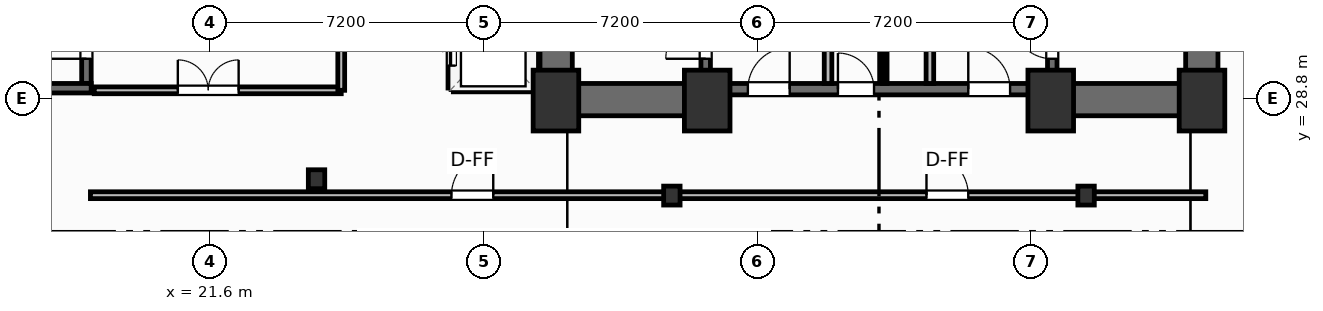
"""IFC4 building model, lengths in metres.
Left out: names, types, materials, properties, quantities, classifications, styles, units other than length and angle.
Written with IfcOpenShell. Run it as: python <this file> out.ifc"""

import sys

from ifc_helpers import new_model, si_unit, direction, frame, frame_2d, origin, origin_2d, place, context, subcontext, project, spatial, rectangle, i_section, extrude, element, fill, save


model = new_model("IFC4")
c1 = context("Model", 3, precision=1e-05, world=origin(), true_north=direction((0.0, 1.0)))
c2 = subcontext(c1, "Body", "Model", "MODEL_VIEW")
j1 = project(units=[si_unit("LENGTHUNIT", "METRE"), si_unit("PLANEANGLEUNIT", "RADIAN")], contexts=[c1])
p1 = place(None, origin())
s1 = spatial("IfcSite", under=j1, at=p1, CompositionType="ELEMENT")
p2 = place(p1, origin())
s2 = spatial("IfcBuilding", under=s1, at=p2, CompositionType="ELEMENT")
p3 = place(p2, frame((0.0, 0.0, -9.0)))
s3 = spatial("IfcBuildingStorey", under=s2, at=p3, CompositionType="ELEMENT", Elevation=-9.0)
for number, where, z_axis, x_axis in (
    (1, (30.7, 28.75, 0.0), (0.0, 0.0, 1.0), (1.0, 0.0, 0.0)),
    (2, (34.68, 28.75, 0.0), (0.0, 0.0, 1.0), (1.0, 0.0, 0.0)),
    (3, (43.72, 28.75, 0.0), (0.0, 0.0, 1.0), (1.0, 0.0, 0.0)),
    (4, (47.7, 28.75, 0.0), (0.0, 0.0, 1.0), (1.0, 0.0, 0.0)),
):
    element("IfcColumn", number, at=place(p3, frame(where, z_axis=z_axis, x_axis=x_axis)), inside=s3, PredefinedType="COLUMN", context=c2, shape_type="SweptSolid", body=[
        extrude(rectangle(XDim=1.2, YDim=1.6, at=origin_2d()), origin(), (0.0, 0.0, 1.0), 4.5),
    ])
for number, where, z_axis, x_axis in (
    (5, (33.75, 26.25, 0.0), (0.0, 0.0, 1.0), (1.0, 0.0, 0.0)),
    (6, (44.65, 26.25, 0.0), (0.0, 0.0, 1.0), (1.0, 0.0, 0.0)),
    (7, (24.4, 26.68, 0.0), (0.0, 0.0, 1.0), (1.0, 0.0, 0.0)),
):
    element("IfcColumn", number, at=place(p3, frame(where, z_axis=z_axis, x_axis=x_axis)), inside=s3, PredefinedType="COLUMN", context=c2, shape_type="SweptSolid", body=[
        extrude(i_section(OverallWidth=0.432, OverallDepth=0.498, WebThickness=0.056, FlangeThickness=0.089, FilletRadius=0.025, at=origin_2d()), origin(), (0.0, 0.0, 1.0), 4.5),
    ])
for number, where, z_axis, x_axis in (
    (8, (30.705, 29.2, 0.0), (0.0, 0.0, 1.0), (0.0, 1.0, 0.0)),
    (9, (47.695, 29.2, 0.0), (0.0, 0.0, 1.0), (0.0, 1.0, 0.0)),
):
    element("IfcWall", number, at=place(p3, frame(where, z_axis=z_axis, x_axis=x_axis)), inside=s3, PredefinedType="SHEAR", context=c2, shape_type="SweptSolid", body=[
        extrude(rectangle(XDim=9.22, YDim=0.85, at=frame_2d((4.61, 0.0))), origin(), (0.0, 0.0, 1.0), 4.2),
    ])
for number, where, z_axis, x_axis in (
    (10, (30.28, 28.775, 0.0), (0.0, 0.0, 1.0), (1.0, 0.0, 0.0)),
    (11, (43.6, 28.775, 0.0), (0.0, 0.0, 1.0), (1.0, 0.0, 0.0)),
):
    element("IfcWall", number, at=place(p3, frame(where, z_axis=z_axis, x_axis=x_axis)), inside=s3, PredefinedType="SHEAR", context=c2, shape_type="SweptSolid", body=[
        extrude(rectangle(XDim=4.52, YDim=0.85, at=frame_2d((2.26, 0.0))), origin(), (0.0, 0.0, 1.0), 4.2),
    ])
p4 = place(p3, frame((34.8, 29.05, 0.0), z_axis=(0.0, 0.0, 1.0), x_axis=(1.0, 0.0, 0.0)))
e12 = element("IfcWall", 12, at=p4, inside=s3, PredefinedType="SHEAR", context=c2, shape_type="SweptSolid", body=[
    extrude(rectangle(XDim=8.8, YDim=0.3, at=frame_2d((4.4, 0.0))), origin(), (0.0, 0.0, 1.0), 4.2),
])
p5 = place(p4, frame((0.95, 0.0, 0.0)))
e13 = element("IfcOpeningElement", 13, at=p5, cuts=e12, PredefinedType="OPENING", context=c2, shape_type="SweptSolid", body=[
    extrude(rectangle(XDim=1.1, YDim=2.15, at=frame_2d((0.55, 1.075))), frame((0.0, 0.16, 0.0), z_axis=(0.0, -1.0, 0.0), x_axis=(1.0, 0.0, 0.0)), (0.0, 0.0, 1.0), 0.32),
])
p6 = place(p4, frame((6.75, 0.0, 0.0)))
e14 = element("IfcOpeningElement", 14, at=p6, cuts=e12, PredefinedType="OPENING", context=c2, shape_type="SweptSolid", body=[
    extrude(rectangle(XDim=1.1, YDim=2.15, at=frame_2d((0.55, 1.075))), frame((0.0, 0.16, 0.0), z_axis=(0.0, -1.0, 0.0), x_axis=(1.0, 0.0, 0.0)), (0.0, 0.0, 1.0), 0.32),
])
p7 = place(p4, frame((3.32, 0.0, 0.0)))
e15 = element("IfcOpeningElement", 15, at=p7, cuts=e12, PredefinedType="OPENING", context=c2, shape_type="SweptSolid", body=[
    extrude(rectangle(XDim=0.95, YDim=2.15, at=frame_2d((0.475, 1.075))), frame((0.0, 0.16, 0.0), z_axis=(0.0, -1.0, 0.0), x_axis=(1.0, 0.0, 0.0)), (0.0, 0.0, 1.0), 0.32),
])
p8 = place(p3, frame((34.64, 29.2, 0.0), z_axis=(0.0, 0.0, 1.0), x_axis=(0.0, 1.0, 0.0)))
e16 = element("IfcWall", 16, at=p8, inside=s3, PredefinedType="SHEAR", context=c2, shape_type="SweptSolid", body=[
    extrude(rectangle(XDim=9.22, YDim=0.25, at=frame_2d((4.61, 0.0))), origin(), (0.0, 0.0, 1.0), 4.2),
])
p9 = place(p8, frame((0.65, 0.0, 0.0)))
e17 = element("IfcOpeningElement", 17, at=p9, cuts=e16, PredefinedType="OPENING", context=c2, shape_type="SweptSolid", body=[
    extrude(rectangle(XDim=1.05, YDim=2.15, at=frame_2d((0.525, 1.075))), frame((0.0, 0.135, 0.0), z_axis=(0.0, -1.0, 0.0), x_axis=(1.0, 0.0, 0.0)), (0.0, 0.0, 1.0), 0.27),
])
p10 = place(p3, frame((43.76, 29.2, 0.0), z_axis=(0.0, 0.0, 1.0), x_axis=(0.0, 1.0, 0.0)))
e18 = element("IfcWall", 18, at=p10, inside=s3, PredefinedType="SHEAR", context=c2, shape_type="SweptSolid", body=[
    extrude(rectangle(XDim=9.22, YDim=0.25, at=frame_2d((4.61, 0.0))), origin(), (0.0, 0.0, 1.0), 4.2),
])
p11 = place(p10, frame((0.65, 0.0, 0.0)))
e19 = element("IfcOpeningElement", 19, at=p11, cuts=e18, PredefinedType="OPENING", context=c2, shape_type="SweptSolid", body=[
    extrude(rectangle(XDim=1.05, YDim=2.15, at=frame_2d((0.525, 1.075))), frame((0.0, 0.135, 0.0), z_axis=(0.0, -1.0, 0.0), x_axis=(1.0, 0.0, 0.0)), (0.0, 0.0, 1.0), 0.27),
])
p12 = place(p3, frame((18.345, 29.2, 0.0), z_axis=(0.0, 0.0, 1.0), x_axis=(0.0, 1.0, 0.0)))
e20 = element("IfcWall", 20, at=p12, inside=s3, PredefinedType="SHEAR", context=c2, shape_type="SweptSolid", body=[
    extrude(rectangle(XDim=9.22, YDim=0.25, at=frame_2d((4.61, 0.0))), origin(), (0.0, 0.0, 1.0), 4.2),
])
p13 = place(p12, frame((0.65, 0.0, 0.0)))
e21 = element("IfcOpeningElement", 21, at=p13, cuts=e20, PredefinedType="OPENING", context=c2, shape_type="SweptSolid", body=[
    extrude(rectangle(XDim=1.05, YDim=2.15, at=frame_2d((0.525, 1.075))), frame((0.0, 0.135, 0.0), z_axis=(0.0, -1.0, 0.0), x_axis=(1.0, 0.0, 0.0)), (0.0, 0.0, 1.0), 0.27),
])
p14 = place(p3, frame((14.58, 29.075, 0.0), z_axis=(0.0, 0.0, 1.0), x_axis=(1.0, 0.0, 0.0)))
e22 = element("IfcWall", 22, at=p14, inside=s3, PredefinedType="SHEAR", context=c2, shape_type="SweptSolid", body=[
    extrude(rectangle(XDim=3.89, YDim=0.25, at=frame_2d((1.945, 0.0))), origin(), (0.0, 0.0, 1.0), 4.2),
])
p15 = place(p3, frame((18.45, 26.26, 0.0), z_axis=(0.0, 0.0, 1.0), x_axis=(1.0, 0.0, 0.0)))
e23 = element("IfcWall", 23, at=p15, inside=s3, PredefinedType="PARTITIONING", context=c2, shape_type="SweptSolid", body=[
    extrude(rectangle(XDim=29.35, YDim=0.18, at=frame_2d((14.675, 0.0))), origin(), (0.0, 0.0, 1.0), 3.412),
])
p16 = place(p15, frame((9.5, 0.0, 0.0)))
e24 = element("IfcOpeningElement", 24, at=p16, cuts=e23, PredefinedType="OPENING", context=c2, shape_type="SweptSolid", body=[
    extrude(rectangle(XDim=1.1, YDim=2.15, at=frame_2d((0.55, 1.075))), frame((0.0, 0.1, 0.0), z_axis=(0.0, -1.0, 0.0), x_axis=(1.0, 0.0, 0.0)), (0.0, 0.0, 1.0), 0.2),
])
p17 = place(p15, frame((22.0, 0.0, 0.0)))
e25 = element("IfcOpeningElement", 25, at=p17, cuts=e23, PredefinedType="OPENING", context=c2, shape_type="SweptSolid", body=[
    extrude(rectangle(XDim=1.1, YDim=2.15, at=frame_2d((0.55, 1.075))), frame((0.0, 0.1, 0.0), z_axis=(0.0, -1.0, 0.0), x_axis=(1.0, 0.0, 0.0)), (0.0, 0.0, 1.0), 0.2),
])
p18 = place(p3, frame((18.55, 29.02, 0.0), z_axis=(0.0, 0.0, 1.0), x_axis=(1.0, 0.0, 0.0)))
e26 = element("IfcWall", 26, at=p18, inside=s3, PredefinedType="PARTITIONING", context=c2, shape_type="SweptSolid", body=[
    extrude(rectangle(XDim=6.5, YDim=0.18, at=frame_2d((3.25, 0.0))), origin(), (0.0, 0.0, 1.0), 4.2),
])
p19 = place(p18, frame((2.2, 0.0, 0.0)))
e27 = element("IfcOpeningElement", 27, at=p19, cuts=e26, PredefinedType="OPENING", context=c2, shape_type="SweptSolid", body=[
    extrude(rectangle(XDim=1.6, YDim=2.05, at=frame_2d((0.8, 1.025))), frame((0.0, 0.1, 0.0), z_axis=(0.0, -1.0, 0.0), x_axis=(1.0, 0.0, 0.0)), (0.0, 0.0, 1.0), 0.2),
])
p20 = place(p3, frame((25.05, 29.02, 0.0), z_axis=(0.0, 0.0, 1.0), x_axis=(0.0, 1.0, 0.0)))
e28 = element("IfcWall", 28, at=p20, inside=s3, PredefinedType="PARTITIONING", context=c2, shape_type="SweptSolid", body=[
    extrude(rectangle(XDim=9.43, YDim=0.18, at=frame_2d((4.715, 0.0))), origin(), (0.0, 0.0, 1.0), 4.2),
])
for number, where, z_axis, x_axis in (
    (29, (37.86, 29.2, 0.0), (0.0, 0.0, 1.0), (0.0, 1.0, 0.0)),
    (30, (40.54, 29.2, 0.0), (0.0, 0.0, 1.0), (0.0, 1.0, 0.0)),
):
    element("IfcWall", number, at=place(p3, frame(where, z_axis=z_axis, x_axis=x_axis)), inside=s3, PredefinedType="PARTITIONING", context=c2, shape_type="SweptSolid", body=[
        extrude(rectangle(XDim=5.18, YDim=0.2, at=frame_2d((2.59, 0.0))), origin(), (0.0, 0.0, 1.0), 4.2),
    ])
p21 = place(p3, frame((39.35, 29.2, 0.0), z_axis=(0.0, 0.0, 1.0), x_axis=(0.0, 1.0, 0.0)))
e31 = element("IfcWall", 31, at=p21, inside=s3, PredefinedType="PARTITIONING", context=c2, shape_type="SweptSolid", body=[
    extrude(rectangle(XDim=5.22, YDim=0.125, at=frame_2d((2.61, 0.0))), origin(), (0.0, 0.0, 1.0), 4.2),
])
p22 = place(p21, frame((2.05, 0.0, 0.0)))
e32 = element("IfcOpeningElement", 32, at=p22, cuts=e31, PredefinedType="OPENING", context=c2, shape_type="SweptSolid", body=[
    extrude(rectangle(XDim=0.85, YDim=2.05, at=frame_2d((0.425, 1.025))), frame((0.0, 0.073, 0.0), z_axis=(0.0, -1.0, 0.0), x_axis=(1.0, 0.0, 0.0)), (0.0, 0.0, 1.0), 0.145),
])
p23 = place(p3, frame((28.0, 29.08, 0.0), z_axis=(0.0, 0.0, 1.0), x_axis=(1.0, 0.0, 0.0)))
e33 = element("IfcWall", 33, at=p23, inside=s3, PredefinedType="PARTITIONING", context=c2, shape_type="SweptSolid", body=[
    extrude(rectangle(XDim=2.1, YDim=0.2, at=frame_2d((1.05, 0.0))), origin(), (0.0, 0.0, 1.0), 4.2),
])
p24 = place(p3, frame((30.12, 29.08, 0.0), z_axis=(0.0, 0.0, 1.0), x_axis=(0.0, 1.0, 0.0)))
e34 = element("IfcWall", 34, at=p24, inside=s3, PredefinedType="PARTITIONING", context=c2, shape_type="SweptSolid", body=[
    extrude(rectangle(XDim=6.89, YDim=0.2, at=frame_2d((3.445, 0.0))), origin(), (0.0, 0.0, 1.0), 4.2),
])
p25 = place(p3, frame((27.96, 29.08, 0.0), z_axis=(0.0, 0.0, 1.0), x_axis=(0.0, 1.0, 0.0)))
e35 = element("IfcWall", 35, at=p25, inside=s3, PredefinedType="PARTITIONING", context=c2, shape_type="SweptSolid", body=[
    extrude(rectangle(XDim=6.89, YDim=0.2, at=frame_2d((3.445, 0.0))), origin(), (0.0, 0.0, 1.0), 4.2),
])
p26 = place(p25, frame((0.59, 0.0, 0.0)))
e36 = element("IfcOpeningElement", 36, at=p26, cuts=e35, PredefinedType="OPENING", context=c2, shape_type="SweptSolid", body=[
    extrude(rectangle(XDim=1.1, YDim=2.15, at=frame_2d((0.55, 1.075))), frame((0.0, 0.11, 0.0), z_axis=(0.0, -1.0, 0.0), x_axis=(1.0, 0.0, 0.0)), (0.0, 0.0, 1.0), 0.22),
])
p27 = place(p25, frame((2.89, 0.0, 0.0)))
e37 = element("IfcOpeningElement", 37, at=p27, cuts=e35, PredefinedType="OPENING", context=c2, shape_type="SweptSolid", body=[
    extrude(rectangle(XDim=1.1, YDim=2.15, at=frame_2d((0.55, 1.075))), frame((0.0, 0.11, 0.0), z_axis=(0.0, -1.0, 0.0), x_axis=(1.0, 0.0, 0.0)), (0.0, 0.0, 1.0), 0.22),
])
p28 = place(p25, frame((5.19, 0.0, 0.0)))
e38 = element("IfcOpeningElement", 38, at=p28, cuts=e35, PredefinedType="OPENING", context=c2, shape_type="SweptSolid", body=[
    extrude(rectangle(XDim=1.1, YDim=2.15, at=frame_2d((0.55, 1.075))), frame((0.0, 0.11, 0.0), z_axis=(0.0, -1.0, 0.0), x_axis=(1.0, 0.0, 0.0)), (0.0, 0.0, 1.0), 0.22),
])
p29 = place(p16, origin())
e39 = element("IfcDoor", 39, at=p29, inside=s3, OperationType="SINGLE_SWING_RIGHT", PredefinedType="DOOR", context=c2, shape_type="SweptSolid", body=[
    extrude(rectangle(XDim=1.1, YDim=2.15, at=frame_2d((0.55, 1.075))), frame((0.0, 0.025, 0.0), z_axis=(0.0, -1.0, 0.0), x_axis=(1.0, 0.0, 0.0)), (0.0, 0.0, 1.0), 0.05),
])
fill(e24, e39)
p30 = place(p17, origin())
e40 = element("IfcDoor", 40, at=p30, inside=s3, OperationType="SINGLE_SWING_LEFT", PredefinedType="DOOR", context=c2, shape_type="SweptSolid", body=[
    extrude(rectangle(XDim=1.1, YDim=2.15, at=frame_2d((0.55, 1.075))), frame((0.0, 0.025, 0.0), z_axis=(0.0, -1.0, 0.0), x_axis=(1.0, 0.0, 0.0)), (0.0, 0.0, 1.0), 0.05),
])
fill(e25, e40)
p31 = place(p19, origin())
e41 = element("IfcDoor", 41, at=p31, inside=s3, OperationType="DOUBLE_DOOR_SINGLE_SWING", PredefinedType="DOOR", context=c2, shape_type="SweptSolid", body=[
    extrude(rectangle(XDim=1.6, YDim=2.05, at=frame_2d((0.8, 1.025))), frame((0.0, 0.025, 0.0), z_axis=(0.0, -1.0, 0.0), x_axis=(1.0, 0.0, 0.0)), (0.0, 0.0, 1.0), 0.05),
])
fill(e27, e41)
p32 = place(p9, origin())
e42 = element("IfcDoor", 42, at=p32, inside=s3, OperationType="SINGLE_SWING_LEFT", PredefinedType="DOOR", context=c2, shape_type="SweptSolid", body=[
    extrude(rectangle(XDim=1.05, YDim=2.15, at=frame_2d((0.525, 1.075))), frame((0.0, 0.025, 0.0), z_axis=(0.0, -1.0, 0.0), x_axis=(1.0, 0.0, 0.0)), (0.0, 0.0, 1.0), 0.05),
])
fill(e17, e42)
p33 = place(p11, origin())
e43 = element("IfcDoor", 43, at=p33, inside=s3, OperationType="SINGLE_SWING_RIGHT", PredefinedType="DOOR", context=c2, shape_type="SweptSolid", body=[
    extrude(rectangle(XDim=1.05, YDim=2.15, at=frame_2d((0.525, 1.075))), frame((0.0, 0.025, 0.0), z_axis=(0.0, -1.0, 0.0), x_axis=(1.0, 0.0, 0.0)), (0.0, 0.0, 1.0), 0.05),
])
fill(e19, e43)
p34 = place(p13, origin())
e44 = element("IfcDoor", 44, at=p34, inside=s3, OperationType="SINGLE_SWING_LEFT", PredefinedType="DOOR", context=c2, shape_type="SweptSolid", body=[
    extrude(rectangle(XDim=1.05, YDim=2.15, at=frame_2d((0.525, 1.075))), frame((0.0, 0.025, 0.0), z_axis=(0.0, -1.0, 0.0), x_axis=(1.0, 0.0, 0.0)), (0.0, 0.0, 1.0), 0.05),
])
fill(e21, e44)
p35 = place(p5, origin())
e45 = element("IfcDoor", 45, at=p35, inside=s3, OperationType="SINGLE_SWING_RIGHT", PredefinedType="DOOR", context=c2, shape_type="SweptSolid", body=[
    extrude(rectangle(XDim=1.1, YDim=2.15, at=frame_2d((0.55, 1.075))), frame((0.0, 0.025, 0.0), z_axis=(0.0, -1.0, 0.0), x_axis=(1.0, 0.0, 0.0)), (0.0, 0.0, 1.0), 0.05),
])
fill(e13, e45)
p36 = place(p6, origin())
e46 = element("IfcDoor", 46, at=p36, inside=s3, OperationType="SINGLE_SWING_LEFT", PredefinedType="DOOR", context=c2, shape_type="SweptSolid", body=[
    extrude(rectangle(XDim=1.1, YDim=2.15, at=frame_2d((0.55, 1.075))), frame((0.0, 0.025, 0.0), z_axis=(0.0, -1.0, 0.0), x_axis=(1.0, 0.0, 0.0)), (0.0, 0.0, 1.0), 0.05),
])
fill(e14, e46)
p37 = place(p7, origin())
e47 = element("IfcDoor", 47, at=p37, inside=s3, OperationType="SINGLE_SWING_LEFT", PredefinedType="DOOR", context=c2, shape_type="SweptSolid", body=[
    extrude(rectangle(XDim=0.95, YDim=2.15, at=frame_2d((0.475, 1.075))), frame((0.0, 0.025, 0.0), z_axis=(0.0, -1.0, 0.0), x_axis=(1.0, 0.0, 0.0)), (0.0, 0.0, 1.0), 0.05),
])
fill(e15, e47)
p38 = place(p26, origin())
e48 = element("IfcDoor", 48, at=p38, inside=s3, OperationType="SLIDING_TO_LEFT", PredefinedType="DOOR", context=c2, shape_type="SweptSolid", body=[
    extrude(rectangle(XDim=1.1, YDim=2.15, at=frame_2d((0.55, 1.075))), frame((0.0, 0.025, 0.0), z_axis=(0.0, -1.0, 0.0), x_axis=(1.0, 0.0, 0.0)), (0.0, 0.0, 1.0), 0.05),
])
fill(e36, e48)
save(model, sys.argv[1])
